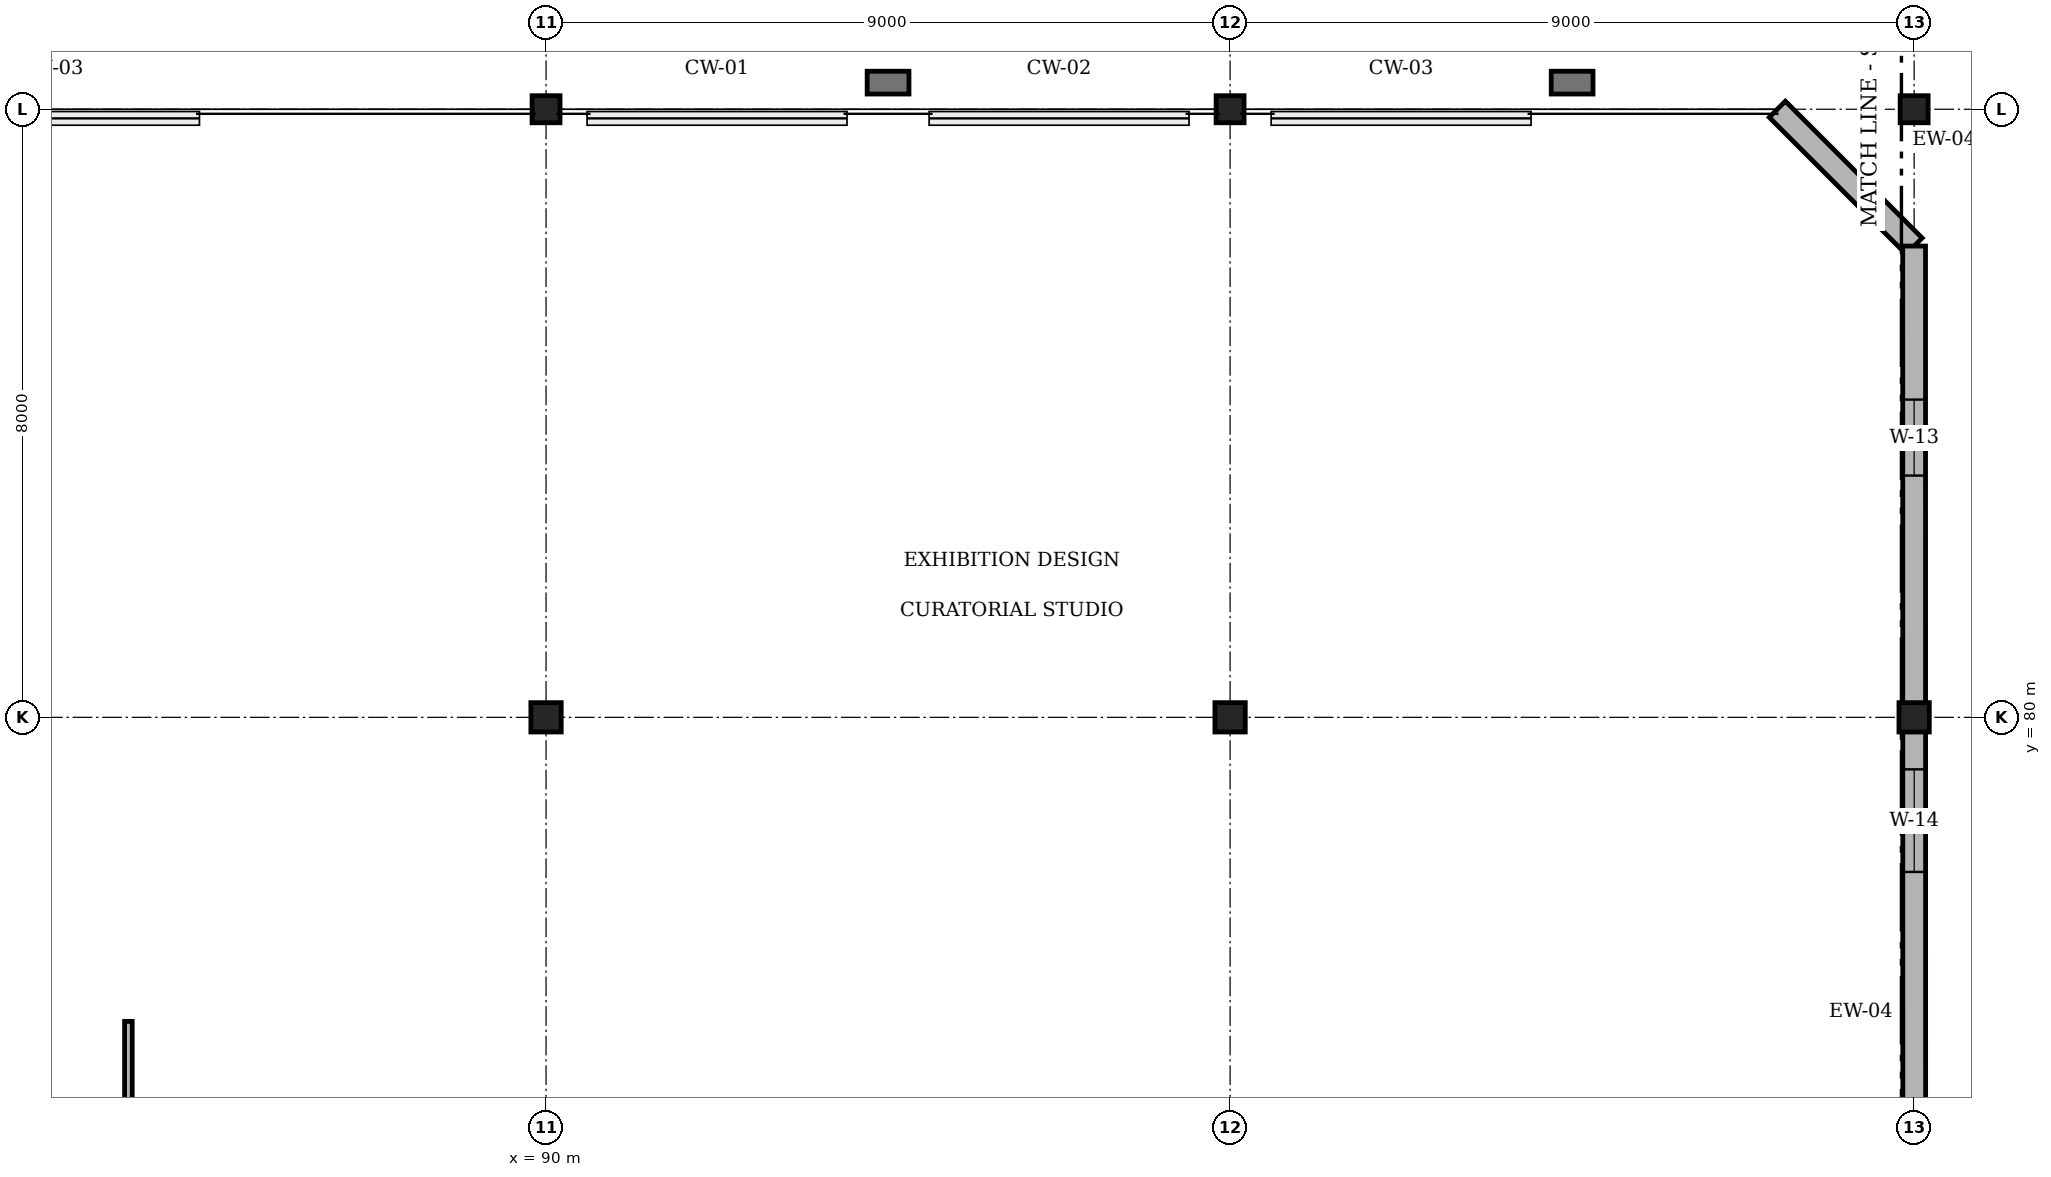
"""IFC4 building model, lengths in metres.
Left out: names, types, materials, properties, quantities, classifications, styles, units other than length and angle.
Written with IfcOpenShell. Run it as: python <this file> out.ifc"""

import sys

from ifc_helpers import new_model, si_unit, direction, frame, frame_2d, origin, origin_2d, place, context, subcontext, project, spatial, rectangle, i_section, extrude, element, fill, save


model = new_model("IFC4")
c1 = context("Model", 3, precision=1e-05, world=origin(), true_north=direction((0.0, 1.0)))
c2 = subcontext(c1, "Body", "Model", "MODEL_VIEW")
j1 = project(units=[si_unit("LENGTHUNIT", "METRE"), si_unit("PLANEANGLEUNIT", "RADIAN")], contexts=[c1])
p1 = place(None, origin())
s1 = spatial("IfcSite", under=j1, at=p1, CompositionType="ELEMENT")
p2 = place(p1, origin())
s2 = spatial("IfcBuilding", under=s1, at=p2, CompositionType="ELEMENT")
p3 = place(p2, frame((0.0, 0.0, 10.8)))
s3 = spatial("IfcBuildingStorey", under=s2, at=p3, CompositionType="ELEMENT", Elevation=10.8)
p4 = place(p3, frame((90.0, 80.0, 0.0), z_axis=(0.0, 0.0, 1.0), x_axis=(1.0, 0.0, 0.0)))
e1 = element("IfcColumn", 1, at=p4, inside=s3, PredefinedType="COLUMN", context=c2, shape_type="SweptSolid", body=[
    extrude(i_section(OverallWidth=0.399, OverallDepth=0.386, WebThickness=0.021, FlangeThickness=0.033, FilletRadius=0.015, at=origin_2d()), origin(), (0.0, 0.0, 1.0), 4.8),
])
p5 = place(p3, frame((90.0, 88.0, 0.0), z_axis=(0.0, 0.0, 1.0), x_axis=(1.0, 0.0, 0.0)))
e2 = element("IfcColumn", 2, at=p5, inside=s3, PredefinedType="COLUMN", context=c2, shape_type="SweptSolid", body=[
    extrude(i_section(OverallWidth=0.368, OverallDepth=0.356, WebThickness=0.011, FlangeThickness=0.018, FilletRadius=0.015, at=origin_2d()), origin(), (0.0, 0.0, 1.0), 4.8),
])
p6 = place(p3, frame((99.0, 80.0, 0.0), z_axis=(0.0, 0.0, 1.0), x_axis=(1.0, 0.0, 0.0)))
e3 = element("IfcColumn", 3, at=p6, inside=s3, PredefinedType="COLUMN", context=c2, shape_type="SweptSolid", body=[
    extrude(i_section(OverallWidth=0.399, OverallDepth=0.386, WebThickness=0.021, FlangeThickness=0.033, FilletRadius=0.015, at=origin_2d()), origin(), (0.0, 0.0, 1.0), 4.8),
])
p7 = place(p3, frame((99.0, 88.0, 0.0), z_axis=(0.0, 0.0, 1.0), x_axis=(1.0, 0.0, 0.0)))
e4 = element("IfcColumn", 4, at=p7, inside=s3, PredefinedType="COLUMN", context=c2, shape_type="SweptSolid", body=[
    extrude(i_section(OverallWidth=0.368, OverallDepth=0.356, WebThickness=0.011, FlangeThickness=0.018, FilletRadius=0.015, at=origin_2d()), origin(), (0.0, 0.0, 1.0), 4.8),
])
p8 = place(p3, frame((108.0, 80.0, 0.0), z_axis=(0.0, 0.0, 1.0), x_axis=(1.0, 0.0, 0.0)))
e5 = element("IfcColumn", 5, at=p8, inside=s3, PredefinedType="COLUMN", context=c2, shape_type="SweptSolid", body=[
    extrude(i_section(OverallWidth=0.399, OverallDepth=0.386, WebThickness=0.021, FlangeThickness=0.033, FilletRadius=0.015, at=origin_2d()), origin(), (0.0, 0.0, 1.0), 4.8),
])
p9 = place(p3, frame((108.0, 88.0, 0.0), z_axis=(0.0, 0.0, 1.0), x_axis=(1.0, 0.0, 0.0)))
e6 = element("IfcColumn", 6, at=p9, inside=s3, PredefinedType="COLUMN", context=c2, shape_type="SweptSolid", body=[
    extrude(i_section(OverallWidth=0.368, OverallDepth=0.356, WebThickness=0.011, FlangeThickness=0.018, FilletRadius=0.015, at=origin_2d()), origin(), (0.0, 0.0, 1.0), 4.8),
])
for number, where, z_axis, x_axis in (
    (7, (94.5, 88.35, 0.0), (0.0, 0.0, 1.0), (1.0, 0.0, 0.0)),
    (8, (103.5, 88.35, 0.0), (0.0, 0.0, 1.0), (1.0, 0.0, 0.0)),
):
    element("IfcColumn", number, at=place(p3, frame(where, z_axis=z_axis, x_axis=x_axis)), inside=s3, PredefinedType="PILASTER", context=c2, shape_type="SweptSolid", body=[
        extrude(rectangle(XDim=0.55, YDim=0.3, at=origin_2d()), origin(), (0.0, 0.0, 1.0), 4.8),
    ])
p10 = place(p3, frame((106.2, 88.0, 0.0), z_axis=(0.0, 0.0, 1.0), x_axis=(0.707106781187, -0.707106781187, 0.0)))
e9 = element("IfcWall", 9, at=p10, inside=s3, PredefinedType="SOLIDWALL", context=c2, shape_type="SweptSolid", body=[
    extrude(rectangle(XDim=2.546, YDim=0.3, at=frame_2d((1.273, 0.0))), origin(), (0.0, 0.0, 1.0), 3.804),
])
p11 = place(p3, frame((108.0, 86.2, 0.0), z_axis=(0.0, 0.0, 1.0), x_axis=(0.000133228364, -0.999999991125, 0.0)))
e10 = element("IfcWall", 10, at=p11, inside=s3, PredefinedType="SOLIDWALL", context=c2, shape_type="SweptSolid", body=[
    extrude(rectangle(XDim=20.157, YDim=0.3, at=frame_2d((10.079, 0.0))), origin(), (0.0, 0.0, 1.0), 3.669),
])
p12 = place(p11, frame((2.02, 0.0, 1.0)))
e11 = element("IfcOpeningElement", 11, at=p12, cuts=e10, PredefinedType="OPENING", context=c2, shape_type="SweptSolid", body=[
    extrude(rectangle(XDim=1.0, YDim=1.6, at=frame_2d((0.5, 0.8))), frame((0.0, 0.16, 0.0), z_axis=(0.0, -1.0, 0.0), x_axis=(1.0, 0.0, 0.0)), (0.0, 0.0, 1.0), 0.32),
])
p13 = place(p11, frame((6.884, 0.0, 1.0)))
e12 = element("IfcOpeningElement", 12, at=p13, cuts=e10, PredefinedType="OPENING", context=c2, shape_type="SweptSolid", body=[
    extrude(rectangle(XDim=1.35, YDim=1.6, at=frame_2d((0.675, 0.8))), frame((0.0, 0.16, 0.0), z_axis=(0.0, -1.0, 0.0), x_axis=(1.0, 0.0, 0.0)), (0.0, 0.0, 1.0), 0.32),
])
p14 = place(p11, frame((11.773, 0.0, 1.0)))
e13 = element("IfcOpeningElement", 13, at=p14, cuts=e10, PredefinedType="OPENING", context=c2, shape_type="SweptSolid", body=[
    extrude(rectangle(XDim=1.65, YDim=1.6, at=frame_2d((0.825, 0.8))), frame((0.0, 0.16, 0.0), z_axis=(0.0, -1.0, 0.0), x_axis=(1.0, 0.0, 0.0)), (0.0, 0.0, 1.0), 0.32),
])
p15 = place(p11, frame((16.663, 0.0, 1.0)))
e14 = element("IfcOpeningElement", 14, at=p15, cuts=e10, PredefinedType="OPENING", context=c2, shape_type="SweptSolid", body=[
    extrude(rectangle(XDim=1.95, YDim=1.6, at=frame_2d((0.975, 0.8))), frame((0.0, 0.16, 0.0), z_axis=(0.0, -1.0, 0.0), x_axis=(1.0, 0.0, 0.0)), (0.0, 0.0, 1.0), 0.32),
])
p16 = place(p3, frame((84.505, 64.0, 0.0), z_axis=(0.0, 0.0, 1.0), x_axis=(0.0, 1.0, 0.0)))
e15 = element("IfcWall", 15, at=p16, inside=s3, PredefinedType="PARTITIONING", context=c2, shape_type="SweptSolid", body=[
    extrude(rectangle(XDim=12.0, YDim=0.1, at=frame_2d((6.0, 0.0))), origin(), (0.0, 0.0, 1.0), 3.15),
])
p17 = place(p16, frame((5.175, 0.0, 0.0)))
e16 = element("IfcOpeningElement", 16, at=p17, cuts=e15, PredefinedType="OPENING", context=c2, shape_type="SweptSolid", body=[
    extrude(rectangle(XDim=1.65, YDim=2.25, at=frame_2d((0.825, 1.125))), frame((0.0, 0.06, 0.0), z_axis=(0.0, -1.0, 0.0), x_axis=(1.0, 0.0, 0.0)), (0.0, 0.0, 1.0), 0.12),
])
p18 = place(p12, origin())
e17 = element("IfcWindow", 17, at=p18, inside=s3, PartitioningType="SINGLE_PANEL", PredefinedType="WINDOW", context=c2, shape_type="SweptSolid", body=[
    extrude(rectangle(XDim=1.0, YDim=1.6, at=frame_2d((0.5, 0.8))), frame((0.0, 0.03, 0.0), z_axis=(0.0, -1.0, 0.0), x_axis=(1.0, 0.0, 0.0)), (0.0, 0.0, 1.0), 0.06),
])
fill(e11, e17)
p19 = place(p13, origin())
e18 = element("IfcWindow", 18, at=p19, inside=s3, PartitioningType="SINGLE_PANEL", PredefinedType="WINDOW", context=c2, shape_type="SweptSolid", body=[
    extrude(rectangle(XDim=1.35, YDim=1.6, at=frame_2d((0.675, 0.8))), frame((0.0, 0.03, 0.0), z_axis=(0.0, -1.0, 0.0), x_axis=(1.0, 0.0, 0.0)), (0.0, 0.0, 1.0), 0.06),
])
fill(e12, e18)
save(model, sys.argv[1])
